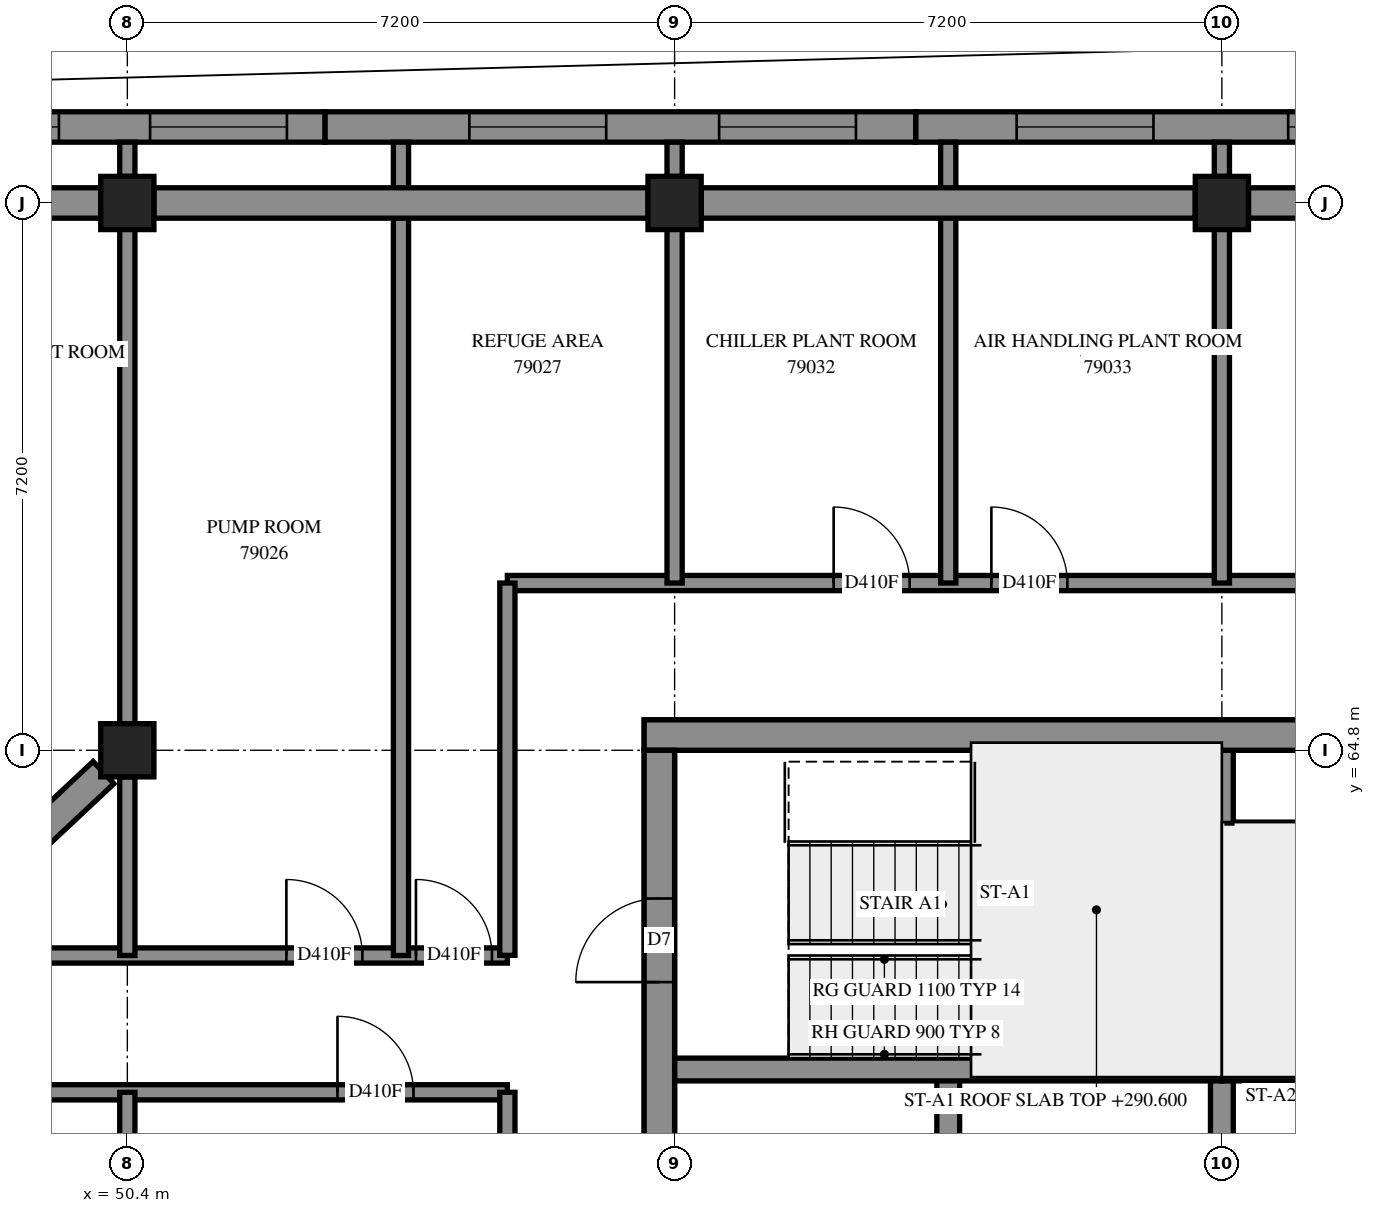
"""IFC4 building model, lengths in metres.
Left out: names, types, materials, properties, quantities, classifications, styles, units other than length and angle.
Written with IfcOpenShell. Run it as: python <this file> out.ifc"""

import sys

from ifc_helpers import new_model, si_unit, direction, frame, frame_2d, origin, origin_2d, place, context, subcontext, project, spatial, polyline, rectangle, outline, extrude, element, fill, save


model = new_model("IFC4")
c1 = context("Model", 3, precision=1e-05, world=origin(), true_north=direction((0.0, 1.0)))
c2 = subcontext(c1, "Body", "Model", "MODEL_VIEW")
j1 = project(units=[si_unit("LENGTHUNIT", "METRE"), si_unit("PLANEANGLEUNIT", "RADIAN")], contexts=[c1])
p1 = place(None, origin())
s1 = spatial("IfcSite", under=j1, at=p1, CompositionType="ELEMENT")
p2 = place(p1, origin())
s2 = spatial("IfcBuilding", under=s1, at=p2, CompositionType="ELEMENT")
p3 = place(p2, frame((0.0, 0.0, 290.6)))
s3 = spatial("IfcBuildingStorey", under=s2, at=p3, CompositionType="ELEMENT", Elevation=290.6)
for number, where, z_axis, x_axis in (
    (1, (50.4, 64.8, 0.0), (0.0, 0.0, 1.0), (1.0, 0.0, 0.0)),
    (2, (50.4, 72.0, 0.0), (0.0, 0.0, 1.0), (1.0, 0.0, 0.0)),
    (3, (57.6, 72.0, 0.0), (0.0, 0.0, 1.0), (1.0, 0.0, 0.0)),
    (4, (64.8, 72.0, 0.0), (0.0, 0.0, 1.0), (1.0, 0.0, 0.0)),
):
    element("IfcColumn", number, at=place(p3, frame(where, z_axis=z_axis, x_axis=x_axis)), inside=s3, PredefinedType="COLUMN", context=c2, shape_type="SweptSolid", body=[
        extrude(rectangle(XDim=0.7, YDim=0.7, at=origin_2d()), origin(), (0.0, 0.0, 1.0), 3.5),
    ])
p4 = place(p3, frame((57.2, 65.0, -0.3), z_axis=(0.0, 0.0, 1.0), x_axis=(1.0, 0.0, 0.0)))
e5 = element("IfcWall", 5, at=p4, inside=s3, PredefinedType="SHEAR", context=c2, shape_type="SweptSolid", body=[
    extrude(rectangle(XDim=15.2, YDim=0.4, at=frame_2d((7.6, 0.0))), origin(), (0.0, 0.0, 1.0), 3.1),
])
p5 = place(p4, frame((10.4, 0.0, 0.3)))
e6 = element("IfcOpeningElement", 6, at=p5, cuts=e5, PredefinedType="OPENING", context=c2, shape_type="SweptSolid", body=[
    extrude(rectangle(XDim=0.8, YDim=2.1, at=frame_2d((0.4, 1.05))), frame((0.0, 0.21, 0.0), z_axis=(0.0, -1.0, 0.0), x_axis=(1.0, 0.0, 0.0)), (0.0, 0.0, 1.0), 0.42),
])
p6 = place(p3, frame((57.4, 50.4, -0.3), z_axis=(0.0, 0.0, 1.0), x_axis=(0.0, 1.0, 0.0)))
e7 = element("IfcWall", 7, at=p6, inside=s3, PredefinedType="SHEAR", context=c2, shape_type="SweptSolid", body=[
    extrude(rectangle(XDim=14.4, YDim=0.4, at=frame_2d((7.2, 0.0))), origin(), (0.0, 0.0, 1.0), 3.1),
])
p7 = place(p6, frame((4.55, 0.0, 0.3)))
e8 = element("IfcOpeningElement", 8, at=p7, cuts=e7, PredefinedType="OPENING", context=c2, shape_type="SweptSolid", body=[
    extrude(rectangle(XDim=1.1, YDim=2.1, at=frame_2d((0.55, 1.05))), frame((0.0, 0.21, 0.0), z_axis=(0.0, -1.0, 0.0), x_axis=(1.0, 0.0, 0.0)), (0.0, 0.0, 1.0), 0.42),
])
p8 = place(p6, frame((11.35, 0.0, 0.3)))
e9 = element("IfcOpeningElement", 9, at=p8, cuts=e7, PredefinedType="OPENING", context=c2, shape_type="SweptSolid", body=[
    extrude(rectangle(XDim=1.1, YDim=2.1, at=frame_2d((0.55, 1.05))), frame((0.0, 0.21, 0.0), z_axis=(0.0, -1.0, 0.0), x_axis=(1.0, 0.0, 0.0)), (0.0, 0.0, 1.0), 0.42),
])
for number, where, z_axis, x_axis in (
    (10, (61.2, 57.3, 0.0), (0.0, 0.0, 1.0), (0.0, 1.0, 0.0)),
    (11, (64.8, 57.3, 0.0), (0.0, 0.0, 1.0), (0.0, 1.0, 0.0)),
):
    element("IfcWall", number, at=place(p3, frame(where, z_axis=z_axis, x_axis=x_axis)), inside=s3, PredefinedType="SOLIDWALL", context=c2, shape_type="SweptSolid", body=[
        extrude(rectangle(XDim=3.3, YDim=0.3, at=frame_2d((1.65, 0.0))), origin(), (0.0, 0.0, 1.0), 3.5),
    ])
for number, where, z_axis, x_axis in (
    (12, (57.6, 60.6, 0.0), (0.0, 0.0, 1.0), (1.0, 0.0, 0.0)),
    (13, (64.8, 60.6, 0.0), (0.0, 0.0, 1.0), (1.0, 0.0, 0.0)),
):
    element("IfcWall", number, at=place(p3, frame(where, z_axis=z_axis, x_axis=x_axis)), inside=s3, PredefinedType="SOLIDWALL", context=c2, shape_type="SweptSolid", body=[
        extrude(rectangle(XDim=7.2, YDim=0.3, at=frame_2d((3.6, 0.0))), origin(), (0.0, 0.0, 1.0), 3.5),
    ])
p9 = place(p3, frame((64.8, 60.6, 0.0), z_axis=(0.0, 0.0, 1.0), x_axis=(0.0, 1.0, 0.0)))
e14 = element("IfcWall", 14, at=p9, inside=s3, PredefinedType="SOLIDWALL", context=c2, shape_type="SweptSolid", body=[
    extrude(rectangle(XDim=4.2, YDim=0.3, at=frame_2d((2.1, 0.0))), origin(), (0.0, 0.0, 1.0), 3.5),
])
p10 = place(p3, frame((68.544, 73.0, 0.0), z_axis=(0.0, 0.0, 1.0), x_axis=(-1.0, 0.0, 0.0)))
e15 = element("IfcWall", 15, at=p10, inside=s3, PredefinedType="SOLIDWALL", context=c2, shape_type="SweptSolid", body=[
    extrude(outline(polyline([(0.0, -0.2), (7.773, -0.2), (7.773, 0.2), (0.0, 0.2), (0.0, -0.2)])), origin(), (0.0, 0.0, 1.0), 3.5),
])
p11 = place(p10, frame((1.072, 0.0, 0.7)))
e16 = element("IfcOpeningElement", 16, at=p11, cuts=e15, PredefinedType="OPENING", context=c2, shape_type="SweptSolid", body=[
    extrude(rectangle(XDim=1.8, YDim=2.2, at=frame_2d((0.9, 1.1))), frame((0.0, 0.21, 0.0), z_axis=(0.0, -1.0, 0.0), x_axis=(1.0, 0.0, 0.0)), (0.0, 0.0, 1.0), 0.42),
])
p12 = place(p10, frame((4.644, 0.0, 0.7)))
e17 = element("IfcOpeningElement", 17, at=p12, cuts=e15, PredefinedType="OPENING", context=c2, shape_type="SweptSolid", body=[
    extrude(rectangle(XDim=1.8, YDim=2.2, at=frame_2d((0.9, 1.1))), frame((0.0, 0.21, 0.0), z_axis=(0.0, -1.0, 0.0), x_axis=(1.0, 0.0, 0.0)), (0.0, 0.0, 1.0), 0.42),
])
p13 = place(p3, frame((60.772, 73.0, 0.0), z_axis=(0.0, 0.0, 1.0), x_axis=(-1.0, 0.0, 0.0)))
e18 = element("IfcWall", 18, at=p13, inside=s3, PredefinedType="SOLIDWALL", context=c2, shape_type="SweptSolid", body=[
    extrude(outline(polyline([(0.0, -0.2), (7.773, -0.2), (7.773, 0.2), (0.0, 0.2), (0.0, -0.2)])), origin(), (0.0, 0.0, 1.0), 3.5),
])
p14 = place(p13, frame((0.786, 0.0, 0.7)))
e19 = element("IfcOpeningElement", 19, at=p14, cuts=e18, PredefinedType="OPENING", context=c2, shape_type="SweptSolid", body=[
    extrude(rectangle(XDim=1.8, YDim=2.2, at=frame_2d((0.9, 1.1))), frame((0.0, 0.21, 0.0), z_axis=(0.0, -1.0, 0.0), x_axis=(1.0, 0.0, 0.0)), (0.0, 0.0, 1.0), 0.42),
])
p15 = place(p13, frame((4.072, 0.0, 0.7)))
e20 = element("IfcOpeningElement", 20, at=p15, cuts=e18, PredefinedType="OPENING", context=c2, shape_type="SweptSolid", body=[
    extrude(rectangle(XDim=1.8, YDim=2.2, at=frame_2d((0.9, 1.1))), frame((0.0, 0.21, 0.0), z_axis=(0.0, -1.0, 0.0), x_axis=(1.0, 0.0, 0.0)), (0.0, 0.0, 1.0), 0.42),
])
p16 = place(p3, frame((52.999, 73.0, 0.0), z_axis=(0.0, 0.0, 1.0), x_axis=(-1.0, 0.0, 0.0)))
e21 = element("IfcWall", 21, at=p16, inside=s3, PredefinedType="SOLIDWALL", context=c2, shape_type="SweptSolid", body=[
    extrude(outline(polyline([(0.0, -0.2), (7.773, -0.2), (7.773, 0.2), (0.0, 0.2), (0.0, -0.2)])), origin(), (0.0, 0.0, 1.0), 3.0),
])
p17 = place(p16, frame((0.499, 0.0, 0.7)))
e22 = element("IfcOpeningElement", 22, at=p17, cuts=e21, PredefinedType="OPENING", context=c2, shape_type="SweptSolid", body=[
    extrude(rectangle(XDim=1.8, YDim=2.2, at=frame_2d((0.9, 1.1))), frame((0.0, 0.21, 0.0), z_axis=(0.0, -1.0, 0.0), x_axis=(1.0, 0.0, 0.0)), (0.0, 0.0, 1.0), 0.42),
])
p18 = place(p16, frame((3.499, 0.0, 0.7)))
e23 = element("IfcOpeningElement", 23, at=p18, cuts=e21, PredefinedType="OPENING", context=c2, shape_type="SweptSolid", body=[
    extrude(rectangle(XDim=1.8, YDim=2.2, at=frame_2d((0.9, 1.1))), frame((0.0, 0.21, 0.0), z_axis=(0.0, -1.0, 0.0), x_axis=(1.0, 0.0, 0.0)), (0.0, 0.0, 1.0), 0.42),
])
p19 = place(p3, frame((64.95, 63.78, 0.0), z_axis=(0.0, 0.0, 1.0), x_axis=(1.0, 0.0, 0.0)))
e24 = element("IfcWall", 24, at=p19, inside=s3, PredefinedType="PARTITIONING", context=c2, shape_type="SweptSolid", body=[
    extrude(rectangle(XDim=5.65, YDim=0.15, at=frame_2d((2.825, 0.0))), origin(), (0.0, 0.0, 1.0), 3.5),
])
p20 = place(p3, frame((55.4, 67.0, 0.0), z_axis=(0.0, 0.0, 1.0), x_axis=(1.0, 0.0, 0.0)))
e25 = element("IfcWall", 25, at=p20, inside=s3, PredefinedType="PARTITIONING", context=c2, shape_type="SweptSolid", body=[
    extrude(rectangle(XDim=18.8, YDim=0.2, at=frame_2d((9.4, 0.0))), origin(), (0.0, 0.0, 1.0), 3.5),
])
p21 = place(p20, frame((4.293, 0.0, 0.0)))
e26 = element("IfcOpeningElement", 26, at=p21, cuts=e25, PredefinedType="OPENING", context=c2, shape_type="SweptSolid", body=[
    extrude(rectangle(XDim=1.0, YDim=2.1, at=frame_2d((0.5, 1.05))), frame((0.0, 0.11, 0.0), z_axis=(0.0, -1.0, 0.0), x_axis=(1.0, 0.0, 0.0)), (0.0, 0.0, 1.0), 0.22),
])
p22 = place(p20, frame((6.367, 0.0, 0.0)))
e27 = element("IfcOpeningElement", 27, at=p22, cuts=e25, PredefinedType="OPENING", context=c2, shape_type="SweptSolid", body=[
    extrude(rectangle(XDim=1.0, YDim=2.1, at=frame_2d((0.5, 1.05))), frame((0.0, 0.11, 0.0), z_axis=(0.0, -1.0, 0.0), x_axis=(1.0, 0.0, 0.0)), (0.0, 0.0, 1.0), 0.22),
])
p23 = place(p20, frame((11.492, 0.0, 0.0)))
e28 = element("IfcOpeningElement", 28, at=p23, cuts=e25, PredefinedType="OPENING", context=c2, shape_type="SweptSolid", body=[
    extrude(rectangle(XDim=1.0, YDim=2.1, at=frame_2d((0.5, 1.05))), frame((0.0, 0.11, 0.0), z_axis=(0.0, -1.0, 0.0), x_axis=(1.0, 0.0, 0.0)), (0.0, 0.0, 1.0), 0.22),
])
p24 = place(p20, frame((13.568, 0.0, 0.0)))
e29 = element("IfcOpeningElement", 29, at=p24, cuts=e25, PredefinedType="OPENING", context=c2, shape_type="SweptSolid", body=[
    extrude(rectangle(XDim=1.0, YDim=2.1, at=frame_2d((0.5, 1.05))), frame((0.0, 0.11, 0.0), z_axis=(0.0, -1.0, 0.0), x_axis=(1.0, 0.0, 0.0)), (0.0, 0.0, 1.0), 0.22),
])
p25 = place(p3, frame((43.2, 60.3, 0.0), z_axis=(0.0, 0.0, 1.0), x_axis=(1.0, 0.0, 0.0)))
e30 = element("IfcWall", 30, at=p25, inside=s3, PredefinedType="PARTITIONING", context=c2, shape_type="SweptSolid", body=[
    extrude(rectangle(XDim=12.2, YDim=0.2, at=frame_2d((6.1, 0.0))), origin(), (0.0, 0.0, 1.0), 3.5),
])
p26 = place(p25, frame((2.033, 0.0, 0.0)))
e31 = element("IfcOpeningElement", 31, at=p26, cuts=e30, PredefinedType="OPENING", context=c2, shape_type="SweptSolid", body=[
    extrude(rectangle(XDim=1.0, YDim=2.1, at=frame_2d((0.5, 1.05))), frame((0.0, 0.11, 0.0), z_axis=(0.0, -1.0, 0.0), x_axis=(1.0, 0.0, 0.0)), (0.0, 0.0, 1.0), 0.22),
])
p27 = place(p25, frame((4.107, 0.0, 0.0)))
e32 = element("IfcOpeningElement", 32, at=p27, cuts=e30, PredefinedType="OPENING", context=c2, shape_type="SweptSolid", body=[
    extrude(rectangle(XDim=1.0, YDim=2.1, at=frame_2d((0.5, 1.05))), frame((0.0, 0.11, 0.0), z_axis=(0.0, -1.0, 0.0), x_axis=(1.0, 0.0, 0.0)), (0.0, 0.0, 1.0), 0.22),
])
p28 = place(p25, frame((9.965, 0.0, 0.0)))
e33 = element("IfcOpeningElement", 33, at=p28, cuts=e30, PredefinedType="OPENING", context=c2, shape_type="SweptSolid", body=[
    extrude(rectangle(XDim=1.0, YDim=2.1, at=frame_2d((0.5, 1.05))), frame((0.0, 0.11, 0.0), z_axis=(0.0, -1.0, 0.0), x_axis=(1.0, 0.0, 0.0)), (0.0, 0.0, 1.0), 0.22),
])
p29 = place(p3, frame((55.4, 49.6, 0.0), z_axis=(0.0, 0.0, 1.0), x_axis=(0.0, 1.0, 0.0)))
e34 = element("IfcWall", 34, at=p29, inside=s3, PredefinedType="PARTITIONING", context=c2, shape_type="SweptSolid", body=[
    extrude(rectangle(XDim=10.7, YDim=0.2, at=frame_2d((5.35, 0.0))), origin(), (0.0, 0.0, 1.0), 3.5),
])
p30 = place(p3, frame((47.702, 62.1, 0.0), z_axis=(0.0, 0.0, 1.0), x_axis=(1.0, 0.0, 0.0)))
e35 = element("IfcWall", 35, at=p30, inside=s3, PredefinedType="PARTITIONING", context=c2, shape_type="SweptSolid", body=[
    extrude(rectangle(XDim=7.698, YDim=0.2, at=frame_2d((3.849, 0.0))), origin(), (0.0, 0.0, 1.0), 3.5),
])
p31 = place(p30, frame((0.265, 0.0, 0.0)))
e36 = element("IfcOpeningElement", 36, at=p31, cuts=e35, PredefinedType="OPENING", context=c2, shape_type="SweptSolid", body=[
    extrude(rectangle(XDim=1.0, YDim=2.1, at=frame_2d((0.5, 1.05))), frame((0.0, 0.11, 0.0), z_axis=(0.0, -1.0, 0.0), x_axis=(1.0, 0.0, 0.0)), (0.0, 0.0, 1.0), 0.22),
])
p32 = place(p30, frame((4.79, 0.0, 0.0)))
e37 = element("IfcOpeningElement", 37, at=p32, cuts=e35, PredefinedType="OPENING", context=c2, shape_type="SweptSolid", body=[
    extrude(rectangle(XDim=1.0, YDim=2.1, at=frame_2d((0.5, 1.05))), frame((0.0, 0.11, 0.0), z_axis=(0.0, -1.0, 0.0), x_axis=(1.0, 0.0, 0.0)), (0.0, 0.0, 1.0), 0.22),
])
p33 = place(p30, frame((6.495, 0.0, 0.0)))
e38 = element("IfcOpeningElement", 38, at=p33, cuts=e35, PredefinedType="OPENING", context=c2, shape_type="SweptSolid", body=[
    extrude(rectangle(XDim=1.0, YDim=2.1, at=frame_2d((0.5, 1.05))), frame((0.0, 0.11, 0.0), z_axis=(0.0, -1.0, 0.0), x_axis=(1.0, 0.0, 0.0)), (0.0, 0.0, 1.0), 0.22),
])
p34 = place(p3, frame((50.4, 64.45, 0.0), z_axis=(0.0, 0.0, 1.0), x_axis=(0.0, 1.0, 0.0)))
e39 = element("IfcWall", 39, at=p34, inside=s3, PredefinedType="PARTITIONING", context=c2, shape_type="SweptSolid", body=[
    extrude(rectangle(XDim=7.9, YDim=0.2, at=frame_2d((3.95, 0.0))), origin(), (0.0, 0.0, 1.0), 3.5),
])
p35 = place(p3, frame((55.4, 62.102, 0.0), z_axis=(0.0, 0.0, 1.0), x_axis=(0.0, 1.0, 0.0)))
e40 = element("IfcWall", 40, at=p35, inside=s3, PredefinedType="PARTITIONING", context=c2, shape_type="SweptSolid", body=[
    extrude(rectangle(XDim=4.898, YDim=0.2, at=frame_2d((2.449, 0.0))), origin(), (0.0, 0.0, 1.0), 3.5),
])
for number, where, z_axis, x_axis in (
    (41, (57.6, 67.0, 0.0), (0.0, 0.0, 1.0), (0.0, 1.0, 0.0)),
    (42, (64.8, 67.0, 0.0), (0.0, 0.0, 1.0), (0.0, 1.0, 0.0)),
):
    element("IfcWall", number, at=place(p3, frame(where, z_axis=z_axis, x_axis=x_axis)), inside=s3, PredefinedType="PARTITIONING", context=c2, shape_type="SweptSolid", body=[
        extrude(rectangle(XDim=5.35, YDim=0.2, at=frame_2d((2.675, 0.0))), origin(), (0.0, 0.0, 1.0), 3.5),
    ])
for number, where, z_axis, x_axis in (
    (43, (50.4, 62.1, 0.0), (0.0, 0.0, 1.0), (0.0, 1.0, 0.0)),
    (44, (50.4, 57.95, 0.0), (0.0, 0.0, 1.0), (0.0, 1.0, 0.0)),
):
    element("IfcWall", number, at=place(p3, frame(where, z_axis=z_axis, x_axis=x_axis)), inside=s3, PredefinedType="PARTITIONING", context=c2, shape_type="SweptSolid", body=[
        extrude(rectangle(XDim=2.35, YDim=0.2, at=frame_2d((1.175, 0.0))), origin(), (0.0, 0.0, 1.0), 3.0),
    ])
p36 = place(p3, frame((54.0, 62.1, 0.0), z_axis=(0.0, 0.0, 1.0), x_axis=(0.0, 1.0, 0.0)))
e45 = element("IfcWall", 45, at=p36, inside=s3, PredefinedType="PARTITIONING", context=c2, shape_type="SweptSolid", body=[
    extrude(outline(polyline([(0.0, -0.1), (10.7, -0.1), (10.7, 0.1), (0.0, 0.1), (0.0, -0.1)])), origin(), (0.0, 0.0, 1.0), 3.5),
])
p37 = place(p3, frame((61.2, 67.0, 0.0), z_axis=(0.0, 0.0, 1.0), x_axis=(0.0, 1.0, 0.0)))
e46 = element("IfcWall", 46, at=p37, inside=s3, PredefinedType="PARTITIONING", context=c2, shape_type="SweptSolid", body=[
    extrude(outline(polyline([(0.0, -0.1), (5.8, -0.1), (5.8, 0.1), (0.0, 0.1), (0.0, -0.1)])), origin(), (0.0, 0.0, 1.0), 3.5),
])
for number, where, z_axis, x_axis in (
    (47, (50.4, 72.35, 0.0), (0.0, 0.0, 1.0), (0.0, 1.0, 0.0)),
    (48, (57.6, 72.35, 0.0), (0.0, 0.0, 1.0), (0.0, 1.0, 0.0)),
    (49, (64.8, 72.35, 0.0), (0.0, 0.0, 1.0), (0.0, 1.0, 0.0)),
):
    element("IfcWall", number, at=place(p3, frame(where, z_axis=z_axis, x_axis=x_axis)), inside=s3, PredefinedType="PARTITIONING", context=c2, shape_type="SweptSolid", body=[
        extrude(outline(polyline([(0.0, -0.1), (0.45, -0.1), (0.45, 0.1), (0.0, 0.1), (0.0, -0.1)])), origin(), (0.0, 0.0, 1.0), 3.5),
    ])
p38 = place(p11, origin())
e50 = element("IfcWindow", 50, at=p38, inside=s3, PartitioningType="SINGLE_PANEL", PredefinedType="WINDOW", context=c2, shape_type="SweptSolid", body=[
    extrude(rectangle(XDim=1.8, YDim=2.2, at=frame_2d((0.9, 1.1))), frame((0.0, 0.08, 0.0), z_axis=(0.0, -1.0, 0.0), x_axis=(1.0, 0.0, 0.0)), (0.0, 0.0, 1.0), 0.06),
])
fill(e16, e50)
p39 = place(p12, origin())
e51 = element("IfcWindow", 51, at=p39, inside=s3, PartitioningType="SINGLE_PANEL", PredefinedType="WINDOW", context=c2, shape_type="SweptSolid", body=[
    extrude(rectangle(XDim=1.8, YDim=2.2, at=frame_2d((0.9, 1.1))), frame((0.0, 0.08, 0.0), z_axis=(0.0, -1.0, 0.0), x_axis=(1.0, 0.0, 0.0)), (0.0, 0.0, 1.0), 0.06),
])
fill(e17, e51)
p40 = place(p14, origin())
e52 = element("IfcWindow", 52, at=p40, inside=s3, PartitioningType="SINGLE_PANEL", PredefinedType="WINDOW", context=c2, shape_type="SweptSolid", body=[
    extrude(rectangle(XDim=1.8, YDim=2.2, at=frame_2d((0.9, 1.1))), frame((0.0, 0.08, 0.0), z_axis=(0.0, -1.0, 0.0), x_axis=(1.0, 0.0, 0.0)), (0.0, 0.0, 1.0), 0.06),
])
fill(e19, e52)
p41 = place(p15, origin())
e53 = element("IfcWindow", 53, at=p41, inside=s3, PartitioningType="SINGLE_PANEL", PredefinedType="WINDOW", context=c2, shape_type="SweptSolid", body=[
    extrude(rectangle(XDim=1.8, YDim=2.2, at=frame_2d((0.9, 1.1))), frame((0.0, 0.08, 0.0), z_axis=(0.0, -1.0, 0.0), x_axis=(1.0, 0.0, 0.0)), (0.0, 0.0, 1.0), 0.06),
])
fill(e20, e53)
p42 = place(p17, origin())
e54 = element("IfcWindow", 54, at=p42, inside=s3, PartitioningType="SINGLE_PANEL", PredefinedType="WINDOW", context=c2, shape_type="SweptSolid", body=[
    extrude(rectangle(XDim=1.8, YDim=2.2, at=frame_2d((0.9, 1.1))), frame((0.0, 0.08, 0.0), z_axis=(0.0, -1.0, 0.0), x_axis=(1.0, 0.0, 0.0)), (0.0, 0.0, 1.0), 0.06),
])
fill(e22, e54)
p43 = place(p18, origin())
e55 = element("IfcWindow", 55, at=p43, inside=s3, PartitioningType="SINGLE_PANEL", PredefinedType="WINDOW", context=c2, shape_type="SweptSolid", body=[
    extrude(rectangle(XDim=1.8, YDim=2.2, at=frame_2d((0.9, 1.1))), frame((0.0, 0.08, 0.0), z_axis=(0.0, -1.0, 0.0), x_axis=(1.0, 0.0, 0.0)), (0.0, 0.0, 1.0), 0.06),
])
fill(e23, e55)
p44 = place(p8, origin())
e56 = element("IfcDoor", 56, at=p44, inside=s3, OperationType="SINGLE_SWING_LEFT", PredefinedType="DOOR", context=c2, shape_type="SweptSolid", body=[
    extrude(rectangle(XDim=1.1, YDim=2.1, at=frame_2d((0.55, 1.05))), frame((0.0, 0.025, 0.0), z_axis=(0.0, -1.0, 0.0), x_axis=(1.0, 0.0, 0.0)), (0.0, 0.0, 1.0), 0.05),
])
fill(e9, e56)
p45 = place(p32, origin())
e57 = element("IfcDoor", 57, at=p45, inside=s3, OperationType="SINGLE_SWING_RIGHT", PredefinedType="DOOR", context=c2, shape_type="SweptSolid", body=[
    extrude(rectangle(XDim=1.0, YDim=2.1, at=frame_2d((0.5, 1.05))), frame((0.0, 0.025, 0.0), z_axis=(0.0, -1.0, 0.0), x_axis=(1.0, 0.0, 0.0)), (0.0, 0.0, 1.0), 0.05),
])
fill(e37, e57)
p46 = place(p33, origin())
e58 = element("IfcDoor", 58, at=p46, inside=s3, OperationType="SINGLE_SWING_LEFT", PredefinedType="DOOR", context=c2, shape_type="SweptSolid", body=[
    extrude(rectangle(XDim=1.0, YDim=2.1, at=frame_2d((0.5, 1.05))), frame((0.0, 0.025, 0.0), z_axis=(0.0, -1.0, 0.0), x_axis=(1.0, 0.0, 0.0)), (0.0, 0.0, 1.0), 0.05),
])
fill(e38, e58)
p47 = place(p28, origin())
e59 = element("IfcDoor", 59, at=p47, inside=s3, OperationType="SINGLE_SWING_LEFT", PredefinedType="DOOR", context=c2, shape_type="SweptSolid", body=[
    extrude(rectangle(XDim=1.0, YDim=2.1, at=frame_2d((0.5, 1.05))), frame((0.0, 0.025, 0.0), z_axis=(0.0, -1.0, 0.0), x_axis=(1.0, 0.0, 0.0)), (0.0, 0.0, 1.0), 0.05),
])
fill(e33, e59)
p48 = place(p21, origin())
e60 = element("IfcDoor", 60, at=p48, inside=s3, OperationType="SINGLE_SWING_RIGHT", PredefinedType="DOOR", context=c2, shape_type="SweptSolid", body=[
    extrude(rectangle(XDim=1.0, YDim=2.1, at=frame_2d((0.5, 1.05))), frame((0.0, 0.025, 0.0), z_axis=(0.0, -1.0, 0.0), x_axis=(1.0, 0.0, 0.0)), (0.0, 0.0, 1.0), 0.05),
])
fill(e26, e60)
p49 = place(p22, origin())
e61 = element("IfcDoor", 61, at=p49, inside=s3, OperationType="SINGLE_SWING_LEFT", PredefinedType="DOOR", context=c2, shape_type="SweptSolid", body=[
    extrude(rectangle(XDim=1.0, YDim=2.1, at=frame_2d((0.5, 1.05))), frame((0.0, 0.025, 0.0), z_axis=(0.0, -1.0, 0.0), x_axis=(1.0, 0.0, 0.0)), (0.0, 0.0, 1.0), 0.05),
])
fill(e27, e61)
save(model, sys.argv[1])
